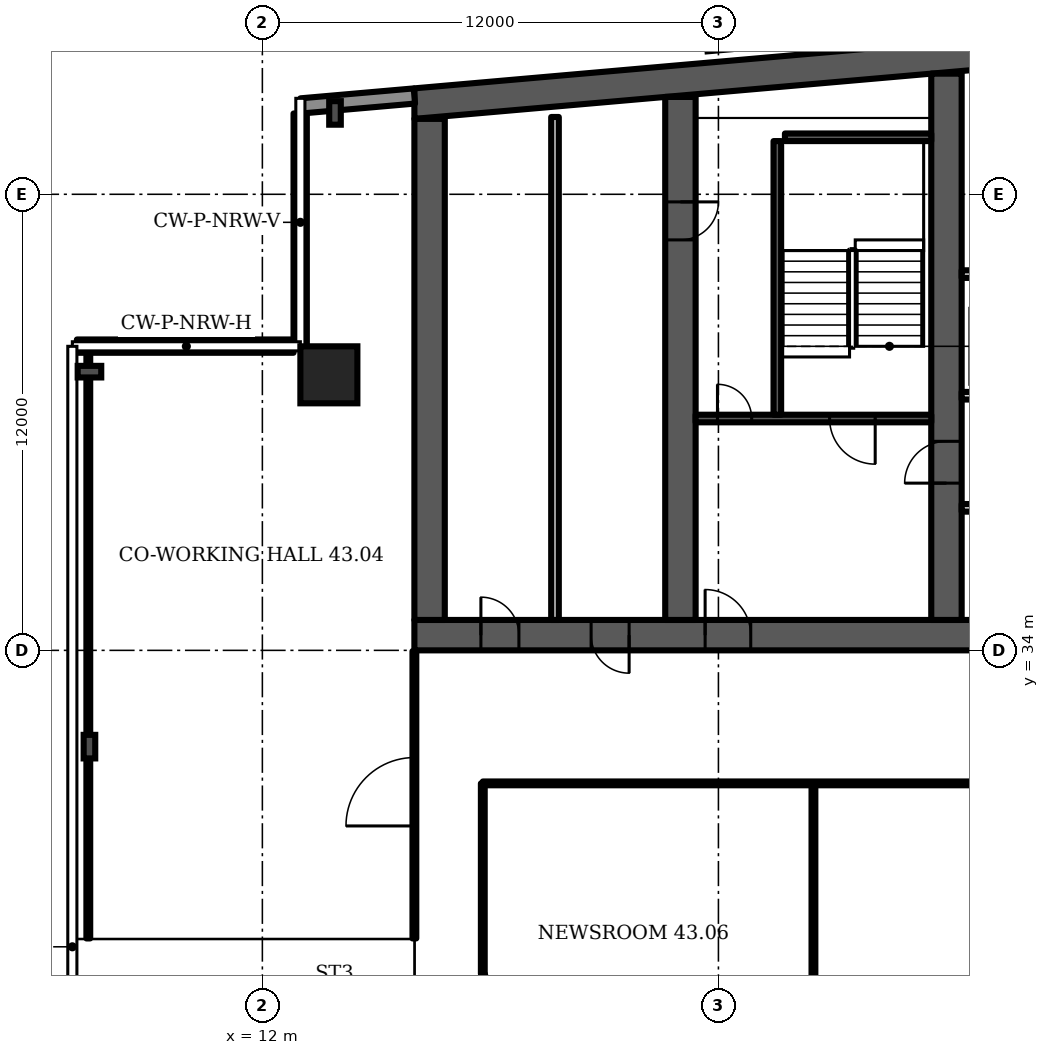
"""IFC4 building model, lengths in metres.
Left out: names, types, materials, properties, quantities, classifications, styles, units other than length and angle.
Written with IfcOpenShell. Run it as: python <this file> out.ifc"""

import sys

from ifc_helpers import new_model, si_unit, direction, frame, frame_2d, origin, origin_2d, place, context, subcontext, project, spatial, polyline, rectangle, i_section, outline, extrude, element, fill, save


model = new_model("IFC4")
c1 = context("Model", 3, precision=1e-05, world=origin(), true_north=direction((0.0, 1.0)))
c2 = subcontext(c1, "Body", "Model", "MODEL_VIEW")
j1 = project(units=[si_unit("LENGTHUNIT", "METRE"), si_unit("PLANEANGLEUNIT", "RADIAN")], contexts=[c1])
p1 = place(None, origin())
s1 = spatial("IfcSite", under=j1, at=p1, CompositionType="ELEMENT")
p2 = place(p1, origin())
s2 = spatial("IfcBuilding", under=s1, at=p2, CompositionType="ELEMENT")
p3 = place(p2, frame((0.0, 0.0, 177.1)))
s3 = spatial("IfcBuildingStorey", under=s2, at=p3, CompositionType="ELEMENT", Elevation=177.1)
p4 = place(p3, frame((0.0, 0.0, -0.0)))
e1 = element("IfcWall", 1, at=p4, inside=s3, PredefinedType="SHEAR", context=c2, shape_type="SweptSolid", body=[
    extrude(outline(polyline([(16.0, 47.984), (37.0, 49.822), (58.0, 47.984), (58.0, 48.787), (37.0, 50.625), (16.0, 48.787), (16.0, 47.984)])), origin(), (0.0, 0.0, 1.0), 3.6),
])
p5 = place(p3, frame((16.0, 34.4, 0.0), z_axis=(0.0, 0.0, 1.0), x_axis=(1.0, 0.0, 0.0)))
e2 = element("IfcWall", 2, at=p5, inside=s3, PredefinedType="SHEAR", context=c2, shape_type="SweptSolid", body=[
    extrude(rectangle(XDim=42.0, YDim=0.8, at=frame_2d((21.0, 0.0))), origin(), (0.0, 0.0, 1.0), 3.6),
])
p6 = place(p5, frame((1.75, 0.0, 0.0)))
e3 = element("IfcOpeningElement", 3, at=p6, cuts=e2, PredefinedType="OPENING", context=c2, shape_type="SweptSolid", body=[
    extrude(rectangle(XDim=1.0, YDim=2.1, at=frame_2d((0.5, 1.05))), frame((0.0, 0.41, 0.0), z_axis=(0.0, -1.0, 0.0), x_axis=(1.0, 0.0, 0.0)), (0.0, 0.0, 1.0), 0.82),
])
p7 = place(p5, frame((4.65, 0.0, 0.0)))
e4 = element("IfcOpeningElement", 4, at=p7, cuts=e2, PredefinedType="OPENING", context=c2, shape_type="SweptSolid", body=[
    extrude(rectangle(XDim=1.0, YDim=2.1, at=frame_2d((0.5, 1.05))), frame((0.0, 0.41, 0.0), z_axis=(0.0, -1.0, 0.0), x_axis=(1.0, 0.0, 0.0)), (0.0, 0.0, 1.0), 0.82),
])
p8 = place(p5, frame((7.65, 0.0, 0.0)))
e5 = element("IfcOpeningElement", 5, at=p8, cuts=e2, PredefinedType="OPENING", context=c2, shape_type="SweptSolid", body=[
    extrude(rectangle(XDim=1.2, YDim=2.1, at=frame_2d((0.6, 1.05))), frame((0.0, 0.41, 0.0), z_axis=(0.0, -1.0, 0.0), x_axis=(1.0, 0.0, 0.0)), (0.0, 0.0, 1.0), 0.82),
])
p9 = place(p5, frame((14.767, 0.0, 0.0)))
e6 = element("IfcOpeningElement", 6, at=p9, cuts=e2, PredefinedType="OPENING", context=c2, shape_type="SweptSolid", body=[
    extrude(rectangle(XDim=1.1, YDim=2.1, at=frame_2d((0.55, 1.05))), frame((0.0, 0.41, 0.0), z_axis=(0.0, -1.0, 0.0), x_axis=(1.0, 0.0, 0.0)), (0.0, 0.0, 1.0), 0.82),
])
p10 = place(p5, frame((19.133, 0.0, 0.0)))
e7 = element("IfcOpeningElement", 7, at=p10, cuts=e2, PredefinedType="OPENING", context=c2, shape_type="SweptSolid", body=[
    extrude(rectangle(XDim=1.1, YDim=2.1, at=frame_2d((0.55, 1.05))), frame((0.0, 0.41, 0.0), z_axis=(0.0, -1.0, 0.0), x_axis=(1.0, 0.0, 0.0)), (0.0, 0.0, 1.0), 0.82),
])
p11 = place(p5, frame((16.8, 0.0, 0.0)))
e8 = element("IfcOpeningElement", 8, at=p11, cuts=e2, PredefinedType="OPENING", context=c2, shape_type="SweptSolid", body=[
    extrude(rectangle(XDim=1.4, YDim=2.1, at=frame_2d((0.7, 1.05))), frame((0.0, 0.41, 0.0), z_axis=(0.0, -1.0, 0.0), x_axis=(1.0, 0.0, 0.0)), (0.0, 0.0, 1.0), 0.82),
])
p12 = place(p5, frame((21.767, 0.0, 0.0)))
e9 = element("IfcOpeningElement", 9, at=p12, cuts=e2, PredefinedType="OPENING", context=c2, shape_type="SweptSolid", body=[
    extrude(rectangle(XDim=1.1, YDim=2.1, at=frame_2d((0.55, 1.05))), frame((0.0, 0.41, 0.0), z_axis=(0.0, -1.0, 0.0), x_axis=(1.0, 0.0, 0.0)), (0.0, 0.0, 1.0), 0.82),
])
p13 = place(p5, frame((23.95, 0.0, 0.0)))
e10 = element("IfcOpeningElement", 10, at=p13, cuts=e2, PredefinedType="OPENING", context=c2, shape_type="SweptSolid", body=[
    extrude(rectangle(XDim=1.1, YDim=2.1, at=frame_2d((0.55, 1.05))), frame((0.0, 0.41, 0.0), z_axis=(0.0, -1.0, 0.0), x_axis=(1.0, 0.0, 0.0)), (0.0, 0.0, 1.0), 0.82),
])
p14 = place(p5, frame((26.133, 0.0, 0.0)))
e11 = element("IfcOpeningElement", 11, at=p14, cuts=e2, PredefinedType="OPENING", context=c2, shape_type="SweptSolid", body=[
    extrude(rectangle(XDim=1.1, YDim=2.1, at=frame_2d((0.55, 1.05))), frame((0.0, 0.41, 0.0), z_axis=(0.0, -1.0, 0.0), x_axis=(1.0, 0.0, 0.0)), (0.0, 0.0, 1.0), 0.82),
])
p15 = place(p5, frame((33.15, 0.0, 0.0)))
e12 = element("IfcOpeningElement", 12, at=p15, cuts=e2, PredefinedType="OPENING", context=c2, shape_type="SweptSolid", body=[
    extrude(rectangle(XDim=1.2, YDim=2.1, at=frame_2d((0.6, 1.05))), frame((0.0, 0.41, 0.0), z_axis=(0.0, -1.0, 0.0), x_axis=(1.0, 0.0, 0.0)), (0.0, 0.0, 1.0), 0.82),
])
p16 = place(p5, frame((35.817, 0.0, 0.0)))
e13 = element("IfcOpeningElement", 13, at=p16, cuts=e2, PredefinedType="OPENING", context=c2, shape_type="SweptSolid", body=[
    extrude(rectangle(XDim=1.0, YDim=2.1, at=frame_2d((0.5, 1.05))), frame((0.0, 0.41, 0.0), z_axis=(0.0, -1.0, 0.0), x_axis=(1.0, 0.0, 0.0)), (0.0, 0.0, 1.0), 0.82),
])
p17 = place(p5, frame((39.95, 0.0, 0.0)))
e14 = element("IfcOpeningElement", 14, at=p17, cuts=e2, PredefinedType="OPENING", context=c2, shape_type="SweptSolid", body=[
    extrude(rectangle(XDim=1.0, YDim=2.1, at=frame_2d((0.5, 1.05))), frame((0.0, 0.41, 0.0), z_axis=(0.0, -1.0, 0.0), x_axis=(1.0, 0.0, 0.0)), (0.0, 0.0, 1.0), 0.82),
])
p18 = place(p5, frame((37.767, 0.0, 0.0)))
e15 = element("IfcOpeningElement", 15, at=p18, cuts=e2, PredefinedType="OPENING", context=c2, shape_type="SweptSolid", body=[
    extrude(rectangle(XDim=1.4, YDim=2.1, at=frame_2d((0.7, 1.05))), frame((0.0, 0.41, 0.0), z_axis=(0.0, -1.0, 0.0), x_axis=(1.0, 0.0, 0.0)), (0.0, 0.0, 1.0), 0.82),
])
p19 = place(p3, frame((16.4, 34.8, 0.0), z_axis=(0.0, 0.0, 1.0), x_axis=(0.0, 1.0, 0.0)))
e16 = element("IfcWall", 16, at=p19, inside=s3, PredefinedType="SHEAR", context=c2, shape_type="SweptSolid", body=[
    extrude(rectangle(XDim=13.184, YDim=0.8, at=frame_2d((6.592, 0.0))), origin(), (0.0, 0.0, 1.0), 3.6),
])
p20 = place(p3, frame((23.0, 34.8, 0.0), z_axis=(0.0, 0.0, 1.0), x_axis=(0.0, 1.0, 0.0)))
e17 = element("IfcWall", 17, at=p20, inside=s3, PredefinedType="SHEAR", context=c2, shape_type="SweptSolid", body=[
    extrude(rectangle(XDim=13.762, YDim=0.8, at=frame_2d((6.881, 0.0))), origin(), (0.0, 0.0, 1.0), 3.6),
])
p21 = place(p20, frame((10.0, 0.0, 0.0)))
e18 = element("IfcOpeningElement", 18, at=p21, cuts=e17, PredefinedType="OPENING", context=c2, shape_type="SweptSolid", body=[
    extrude(rectangle(XDim=1.0, YDim=2.1, at=frame_2d((0.5, 1.05))), frame((0.0, 0.41, 0.0), z_axis=(0.0, -1.0, 0.0), x_axis=(1.0, 0.0, 0.0)), (0.0, 0.0, 1.0), 0.82),
])
p22 = place(p3, frame((30.0, 34.8, 0.0), z_axis=(0.0, 0.0, 1.0), x_axis=(0.0, 1.0, 0.0)))
e19 = element("IfcWall", 19, at=p22, inside=s3, PredefinedType="SHEAR", context=c2, shape_type="SweptSolid", body=[
    extrude(rectangle(XDim=14.374, YDim=0.8, at=frame_2d((7.187, 0.0))), origin(), (0.0, 0.0, 1.0), 3.6),
])
p23 = place(p22, frame((3.6, 0.0, 0.0)))
e20 = element("IfcOpeningElement", 20, at=p23, cuts=e19, PredefinedType="OPENING", context=c2, shape_type="SweptSolid", body=[
    extrude(rectangle(XDim=1.1, YDim=2.1, at=frame_2d((0.55, 1.05))), frame((0.0, 0.41, 0.0), z_axis=(0.0, -1.0, 0.0), x_axis=(1.0, 0.0, 0.0)), (0.0, 0.0, 1.0), 0.82),
])
p24 = place(p3, frame((13.75, 41.25, 0.0), z_axis=(0.0, 0.0, 1.0), x_axis=(1.0, 0.0, 0.0)))
e21 = element("IfcColumn", 21, at=p24, inside=s3, PredefinedType="COLUMN", context=c2, shape_type="SweptSolid", body=[
    extrude(rectangle(XDim=1.5, YDim=1.5, at=origin_2d()), origin(), (0.0, 0.0, 1.0), 3.6),
])
for number, where, z_axis, x_axis in (
    (22, (13.911, 48.141, 0.0), (0.0, 0.0, 1.0), (-1.0, 0.0, 0.0)),
    (23, (7.45, 41.333, 0.0), (0.0, 0.0, 1.0), (0.0, 1.0, 0.0)),
    (24, (7.45, 31.467, 0.0), (0.0, 0.0, 1.0), (-1.0, 0.0, 0.0)),
):
    element("IfcColumn", number, at=place(p3, frame(where, z_axis=z_axis, x_axis=x_axis)), inside=s3, PredefinedType="COLUMN", context=c2, shape_type="SweptSolid", body=[
        extrude(i_section(OverallWidth=0.305, OverallDepth=0.62, WebThickness=0.021, FlangeThickness=0.04, FilletRadius=0.027, at=origin_2d()), origin(), (0.0, 0.0, 1.0), 3.6),
    ])
p25 = place(p3, frame((16.0, 48.587, 0.0), z_axis=(0.0, 0.0, 1.0), x_axis=(-0.996194, -0.087168, 0.0)))
e25 = element("IfcWall", 25, at=p25, inside=s3, PredefinedType="SOLIDWALL", context=c2, shape_type="SweptSolid", body=[
    extrude(rectangle(XDim=2.994, YDim=0.4, at=frame_2d((1.497, 0.0))), origin(), (0.0, 0.0, 1.0), 3.2),
])
p26 = place(p3, frame((12.995, 48.126, 0.0), z_axis=(0.0, 0.0, 1.0), x_axis=(0.0, -1.0, 0.0)))
e26 = element("IfcWall", 26, at=p26, inside=s3, PredefinedType="SOLIDWALL", context=c2, shape_type="SweptSolid", body=[
    extrude(rectangle(XDim=6.126, YDim=0.35, at=frame_2d((3.063, 0.0))), origin(), (0.0, 0.0, 1.0), 1.0),
])
p27 = place(p3, frame((12.82, 42.005, 0.0), z_axis=(0.0, 0.0, 1.0), x_axis=(-1.0, 0.0, 0.0)))
e27 = element("IfcWall", 27, at=p27, inside=s3, PredefinedType="SOLIDWALL", context=c2, shape_type="SweptSolid", body=[
    extrude(rectangle(XDim=5.7, YDim=0.35, at=frame_2d((2.85, 0.0))), origin(), (0.0, 0.0, 1.0), 1.0),
])
p28 = place(p3, frame((19.7, 34.8, 0.0), z_axis=(0.0, 0.0, 1.0), x_axis=(0.0, 1.0, 0.0)))
e28 = element("IfcWall", 28, at=p28, inside=s3, PredefinedType="PARTITIONING", context=c2, shape_type="SweptSolid", body=[
    extrude(rectangle(XDim=13.234, YDim=0.2, at=frame_2d((6.617, 0.0))), origin(), (0.0, 0.0, 1.0), 3.2),
])
p29 = place(p3, frame((23.4, 40.1, 0.0), z_axis=(0.0, 0.0, 1.0), x_axis=(1.0, 0.0, 0.0)))
e29 = element("IfcWall", 29, at=p29, inside=s3, PredefinedType="SHEAR", context=c2, shape_type="SweptSolid", body=[
    extrude(rectangle(XDim=6.2, YDim=0.2, at=frame_2d((3.1, 0.0))), origin(), (0.0, 0.0, 1.0), 3.2),
])
p30 = place(p29, frame((3.525, 0.0, 0.0)))
e30 = element("IfcOpeningElement", 30, at=p30, cuts=e29, PredefinedType="OPENING", context=c2, shape_type="SweptSolid", body=[
    extrude(rectangle(XDim=1.2, YDim=2.1, at=frame_2d((0.6, 1.05))), frame((0.0, 0.11, 0.0), z_axis=(0.0, -1.0, 0.0), x_axis=(1.0, 0.0, 0.0)), (0.0, 0.0, 1.0), 0.22),
])
p31 = place(p29, frame((0.575, 0.0, 0.0)))
e31 = element("IfcOpeningElement", 31, at=p31, cuts=e29, PredefinedType="OPENING", context=c2, shape_type="SweptSolid", body=[
    extrude(rectangle(XDim=0.9, YDim=2.1, at=frame_2d((0.45, 1.05))), frame((0.0, 0.11, 0.0), z_axis=(0.0, -1.0, 0.0), x_axis=(1.0, 0.0, 0.0)), (0.0, 0.0, 1.0), 0.22),
])
p32 = place(p3, frame((25.55, 40.2, 0.0), z_axis=(0.0, 0.0, 1.0), x_axis=(0.0, 1.0, 0.0)))
e32 = element("IfcWall", 32, at=p32, inside=s3, PredefinedType="SHEAR", context=c2, shape_type="SweptSolid", body=[
    extrude(rectangle(XDim=7.2, YDim=0.2, at=frame_2d((3.6, 0.0))), origin(), (0.0, 0.0, 1.0), 3.2),
])
p33 = place(p3, frame((25.75, 47.5, 0.0), z_axis=(0.0, 0.0, 1.0), x_axis=(1.0, 0.0, 0.0)))
e33 = element("IfcWall", 33, at=p33, inside=s3, PredefinedType="SHEAR", context=c2, shape_type="SweptSolid", body=[
    extrude(rectangle(XDim=3.85, YDim=0.2, at=frame_2d((1.925, 0.0))), origin(), (0.0, 0.0, 1.0), 3.2),
])
p34 = place(p3, frame((30.4, 40.7, 0.0), z_axis=(0.0, 0.0, 1.0), x_axis=(1.0, 0.0, 0.0)))
e34 = element("IfcWall", 34, at=p34, inside=s3, PredefinedType="PARTITIONING", context=c2, shape_type="SweptSolid", body=[
    extrude(rectangle(XDim=6.2, YDim=0.2, at=frame_2d((3.1, 0.0))), origin(), (0.0, 0.0, 1.0), 3.2),
])
p35 = place(p34, frame((0.367, 0.0, 0.0)))
e35 = element("IfcOpeningElement", 35, at=p35, cuts=e34, PredefinedType="OPENING", context=c2, shape_type="SweptSolid", body=[
    extrude(rectangle(XDim=1.1, YDim=2.1, at=frame_2d((0.55, 1.05))), frame((0.0, 0.11, 0.0), z_axis=(0.0, -1.0, 0.0), x_axis=(1.0, 0.0, 0.0)), (0.0, 0.0, 1.0), 0.22),
])
p36 = place(p34, frame((2.55, 0.0, 0.0)))
e36 = element("IfcOpeningElement", 36, at=p36, cuts=e34, PredefinedType="OPENING", context=c2, shape_type="SweptSolid", body=[
    extrude(rectangle(XDim=1.1, YDim=2.1, at=frame_2d((0.55, 1.05))), frame((0.0, 0.11, 0.0), z_axis=(0.0, -1.0, 0.0), x_axis=(1.0, 0.0, 0.0)), (0.0, 0.0, 1.0), 0.22),
])
p37 = place(p34, frame((4.733, 0.0, 0.0)))
e37 = element("IfcOpeningElement", 37, at=p37, cuts=e34, PredefinedType="OPENING", context=c2, shape_type="SweptSolid", body=[
    extrude(rectangle(XDim=1.1, YDim=2.1, at=frame_2d((0.55, 1.05))), frame((0.0, 0.11, 0.0), z_axis=(0.0, -1.0, 0.0), x_axis=(1.0, 0.0, 0.0)), (0.0, 0.0, 1.0), 0.22),
])
p38 = place(p3, frame((0.0, 0.0, -0.0)))
e38 = element("IfcWall", 38, at=p38, inside=s3, PredefinedType="PARTITIONING", context=c2, shape_type="SweptSolid", body=[
    extrude(outline(polyline([(32.233, 37.65), (30.4, 37.65), (30.4, 37.85), (32.233, 37.85), (32.433, 37.85), (32.433, 34.8), (32.233, 34.8), (32.233, 37.65)])), origin(), (0.0, 0.0, 1.0), 3.2),
])
p39 = place(p3, frame((0.0, 0.0, -0.0)))
e39 = element("IfcWall", 39, at=p39, inside=s3, PredefinedType="PARTITIONING", context=c2, shape_type="SweptSolid", body=[
    extrude(outline(polyline([(32.433, 40.8), (32.233, 40.8), (32.233, 43.8), (30.4, 43.8), (30.4, 44.0), (36.6, 44.0), (36.6, 43.8), (34.767, 43.8), (34.767, 40.8), (34.567, 40.8), (34.567, 43.8), (32.433, 43.8), (32.433, 40.8)])), origin(), (0.0, 0.0, 1.0), 3.2),
])
p40 = place(p3, frame((7.42, 26.42, 0.0), z_axis=(0.0, 0.0, 1.0), x_axis=(0.0, 1.0, 0.0)))
e40 = element("IfcWall", 40, at=p40, inside=s3, PredefinedType="PARTITIONING", context=c2, shape_type="SweptSolid", body=[
    extrude(rectangle(XDim=15.56, YDim=0.1, at=frame_2d((7.78, 0.0))), origin(), (0.0, 0.0, 1.0), 2.58),
])
p41 = place(p3, frame((16.0, 26.42, 0.0), z_axis=(0.0, 0.0, 1.0), x_axis=(0.0, 1.0, 0.0)))
e41 = element("IfcWall", 41, at=p41, inside=s3, PredefinedType="PARTITIONING", context=c2, shape_type="SweptSolid", body=[
    extrude(rectangle(XDim=7.56, YDim=0.1, at=frame_2d((3.78, 0.0))), origin(), (0.0, 0.0, 1.0), 3.2),
])
p42 = place(p41, frame((2.96, 0.0, 0.0)))
e42 = element("IfcOpeningElement", 42, at=p42, cuts=e41, PredefinedType="OPENING", context=c2, shape_type="SweptSolid", body=[
    extrude(rectangle(XDim=1.8, YDim=2.1, at=frame_2d((0.9, 1.05))), frame((0.0, 0.06, 0.0), z_axis=(0.0, -1.0, 0.0), x_axis=(1.0, 0.0, 0.0)), (0.0, 0.0, 1.0), 0.12),
])
p43 = place(p3, frame((17.8, 25.485, 0.0), z_axis=(0.0, 0.0, 1.0), x_axis=(0.0, 1.0, 0.0)))
e43 = element("IfcWall", 43, at=p43, inside=s3, PredefinedType="PARTITIONING", context=c2, shape_type="SweptSolid", body=[
    extrude(rectangle(XDim=5.015, YDim=0.1, at=frame_2d((2.507, 0.0))), origin(), (0.0, 0.0, 1.0), 3.2),
])
p44 = place(p3, frame((17.8, 30.5, 0.0), z_axis=(0.0, 0.0, 1.0), x_axis=(1.0, 0.0, 0.0)))
e44 = element("IfcWall", 44, at=p44, inside=s3, PredefinedType="PARTITIONING", context=c2, shape_type="SweptSolid", body=[
    extrude(rectangle(XDim=19.05, YDim=0.1, at=frame_2d((9.525, 0.0))), origin(), (0.0, 0.0, 1.0), 3.2),
])
p45 = place(p3, frame((18.055, 24.66, 0.0), z_axis=(0.0, 0.0, 1.0), x_axis=(-0.295119, 0.955462, 0.0)))
e45 = element("IfcWall", 45, at=p45, inside=s3, PredefinedType="PARTITIONING", context=c2, shape_type="SweptSolid", body=[
    extrude(rectangle(XDim=0.864, YDim=0.1, at=frame_2d((0.432, 0.0))), origin(), (0.0, 0.0, 1.0), 3.2),
])
p46 = place(p3, frame((26.5, 13.535, 0.0), z_axis=(0.0, 0.0, 1.0), x_axis=(0.0, 1.0, 0.0)))
e46 = element("IfcWall", 46, at=p46, inside=s3, PredefinedType="PARTITIONING", context=c2, shape_type="SweptSolid", body=[
    extrude(rectangle(XDim=16.965, YDim=0.1, at=frame_2d((8.482, 0.0))), origin(), (0.0, 0.0, 1.0), 3.2),
])
p47 = place(p6, origin())
e47 = element("IfcDoor", 47, at=p47, inside=s3, OperationType="SINGLE_SWING_LEFT", PredefinedType="DOOR", context=c2, shape_type="SweptSolid", body=[
    extrude(rectangle(XDim=1.0, YDim=2.1, at=frame_2d((0.5, 1.05))), frame((0.0, 0.4, 0.0), z_axis=(0.0, -1.0, 0.0), x_axis=(1.0, 0.0, 0.0)), (0.0, 0.0, 1.0), 0.8),
])
fill(e3, e47)
p48 = place(p7, origin())
e48 = element("IfcDoor", 48, at=p48, inside=s3, OperationType="SINGLE_SWING_RIGHT", PredefinedType="DOOR", context=c2, shape_type="SweptSolid", body=[
    extrude(rectangle(XDim=1.0, YDim=2.1, at=frame_2d((0.5, 1.05))), frame((0.0, 0.4, 0.0), z_axis=(0.0, -1.0, 0.0), x_axis=(1.0, 0.0, 0.0)), (0.0, 0.0, 1.0), 0.8),
])
fill(e4, e48)
p49 = place(p30, origin())
e49 = element("IfcDoor", 49, at=p49, inside=s3, OperationType="SINGLE_SWING_RIGHT", PredefinedType="DOOR", context=c2, shape_type="SweptSolid", body=[
    extrude(rectangle(XDim=1.2, YDim=2.1, at=frame_2d((0.6, 1.05))), frame((0.0, 0.025, 0.0), z_axis=(0.0, -1.0, 0.0), x_axis=(1.0, 0.0, 0.0)), (0.0, 0.0, 1.0), 0.05),
])
fill(e30, e49)
p50 = place(p31, origin())
e50 = element("IfcDoor", 50, at=p50, inside=s3, OperationType="SINGLE_SWING_LEFT", PredefinedType="DOOR", context=c2, shape_type="SweptSolid", body=[
    extrude(rectangle(XDim=0.9, YDim=2.1, at=frame_2d((0.45, 1.05))), frame((0.0, 0.025, 0.0), z_axis=(0.0, -1.0, 0.0), x_axis=(1.0, 0.0, 0.0)), (0.0, 0.0, 1.0), 0.05),
])
fill(e31, e50)
p51 = place(p8, origin())
e51 = element("IfcDoor", 51, at=p51, inside=s3, OperationType="SINGLE_SWING_LEFT", PredefinedType="DOOR", context=c2, shape_type="SweptSolid", body=[
    extrude(rectangle(XDim=1.2, YDim=2.1, at=frame_2d((0.6, 1.05))), frame((0.0, 0.025, 0.0), z_axis=(0.0, -1.0, 0.0), x_axis=(1.0, 0.0, 0.0)), (0.0, 0.0, 1.0), 0.05),
])
fill(e5, e51)
p52 = place(p21, origin())
e52 = element("IfcDoor", 52, at=p52, inside=s3, OperationType="SINGLE_SWING_RIGHT", PredefinedType="DOOR", context=c2, shape_type="SweptSolid", body=[
    extrude(rectangle(XDim=1.0, YDim=2.1, at=frame_2d((0.5, 1.05))), frame((0.0, 0.4, 0.0), z_axis=(0.0, -1.0, 0.0), x_axis=(1.0, 0.0, 0.0)), (0.0, 0.0, 1.0), 0.8),
])
fill(e18, e52)
p53 = place(p23, origin())
e53 = element("IfcDoor", 53, at=p53, inside=s3, OperationType="SINGLE_SWING_LEFT", PredefinedType="DOOR", context=c2, shape_type="SweptSolid", body=[
    extrude(rectangle(XDim=1.1, YDim=2.1, at=frame_2d((0.55, 1.05))), frame((0.0, 0.025, 0.0), z_axis=(0.0, -1.0, 0.0), x_axis=(1.0, 0.0, 0.0)), (0.0, 0.0, 1.0), 0.05),
])
fill(e20, e53)
p54 = place(p42, origin())
e54 = element("IfcDoor", 54, at=p54, inside=s3, OperationType="DOUBLE_DOOR_SINGLE_SWING", PredefinedType="DOOR", context=c2, shape_type="SweptSolid", body=[
    extrude(rectangle(XDim=1.8, YDim=2.1, at=frame_2d((0.9, 1.05))), frame((0.0, 0.025, 0.0), z_axis=(0.0, -1.0, 0.0), x_axis=(1.0, 0.0, 0.0)), (0.0, 0.0, 1.0), 0.05),
])
fill(e42, e54)
save(model, sys.argv[1])
